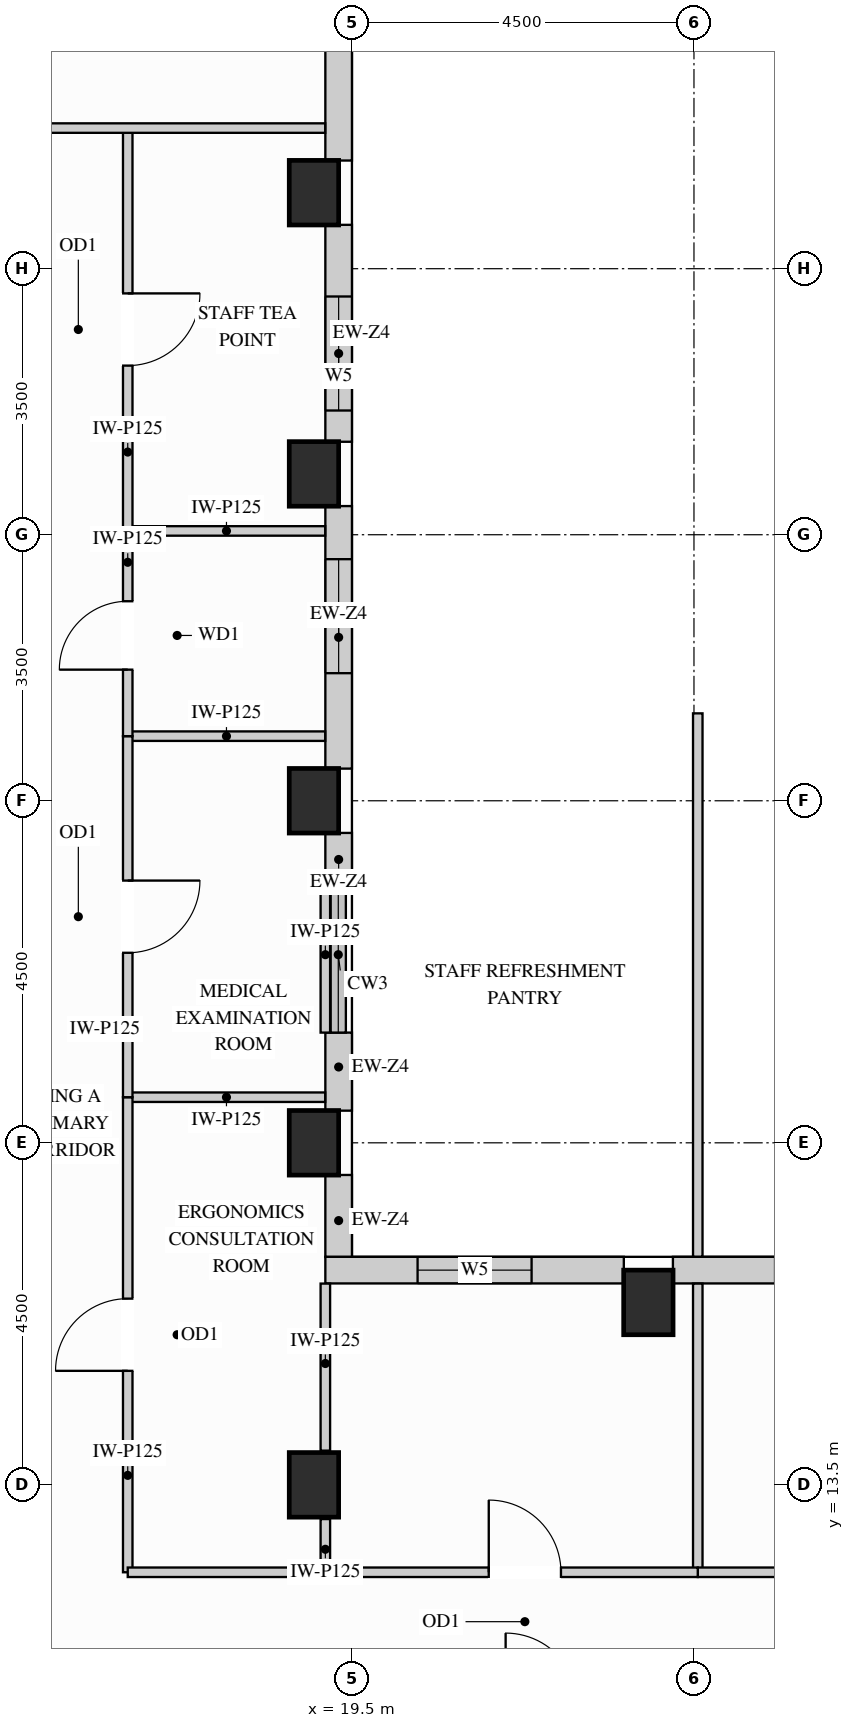
"""IFC4 building model, lengths in metres.
Left out: names, types, materials, properties, quantities, classifications, styles, units other than length and angle.
Written with IfcOpenShell. Run it as: python <this file> out.ifc"""

import sys

from ifc_helpers import new_model, si_unit, direction, frame, frame_2d, origin, origin_2d, place, context, subcontext, project, spatial, rectangle, extrude, source, transform, mapped, element, fill, save


model = new_model("IFC4")
c1 = context("Model", 3, precision=1e-05, world=origin(), true_north=direction((0.0, 1.0)))
c2 = subcontext(c1, "Body", "Model", "MODEL_VIEW")
j1 = project(units=[si_unit("LENGTHUNIT", "METRE"), si_unit("PLANEANGLEUNIT", "RADIAN")], contexts=[c1])
p1 = place(None, origin())
s1 = spatial("IfcSite", under=j1, at=p1, CompositionType="ELEMENT")
p2 = place(p1, origin())
s2 = spatial("IfcBuilding", under=s1, at=p2, CompositionType="ELEMENT")
p3 = place(p2, frame((0.0, 0.0, 226.8)))
s3 = spatial("IfcBuildingStorey", under=s2, at=p3, CompositionType="ELEMENT", Elevation=226.8)
m1 = source(origin(), c2, "Body", "SweptSolid", [
    extrude(rectangle(XDim=0.65, YDim=0.85, at=origin_2d()), origin(), (0.0, 0.0, 1.0), 3.4),
])
for number, where, z_axis, x_axis in (
    (1, (19.0, 13.5, 0.0), (0.0, 0.0, 1.0), (1.0, 0.0, 0.0)),
    (2, (19.0, 18.0, 0.0), (0.0, 0.0, 1.0), (1.0, 0.0, 0.0)),
    (3, (19.0, 22.5, 0.0), (0.0, 0.0, 1.0), (1.0, 0.0, 0.0)),
    (4, (19.0, 26.8, 0.0), (0.0, 0.0, 1.0), (1.0, 0.0, 0.0)),
    (5, (19.0, 30.5, 0.0), (0.0, 0.0, 1.0), (1.0, 0.0, 0.0)),
    (6, (23.4, 15.9, 0.0), (0.0, 0.0, 1.0), (1.0, 0.0, 0.0)),
):
    element("IfcColumn", number, at=place(p3, frame(where, z_axis=z_axis, x_axis=x_axis)), inside=s3, PredefinedType="COLUMN", context=c2, shape_type="MappedRepresentation", body=[
        mapped(m1, transform((0.0, 0.0, 0.0), x_axis=(1.0, 0.0, 0.0), y_axis=(0.0, 1.0, 0.0), z_axis=(0.0, 0.0, 1.0))),
    ])
m2 = source(origin(), c2, "Body", "SweptSolid", [
    extrude(rectangle(XDim=1.079, YDim=0.35, at=frame_2d((0.54, 0.0))), origin(), (0.0, 0.0, 1.0), 2.619),
])
p4 = place(p3, frame((19.325, 16.498, 0.0), z_axis=(0.0, 0.0, 1.0), x_axis=(0.0, 1.0, 0.0)))
e7 = element("IfcWall", 7, at=p4, inside=s3, PredefinedType="SOLIDWALL", context=c2, shape_type="MappedRepresentation", body=[
    mapped(m2, transform((0.0, 0.0, 0.0), x_axis=(1.0, 0.0, 0.0), y_axis=(0.0, 1.0, 0.0), z_axis=(0.0, 0.0, 1.0))),
])
m3 = source(origin(), c2, "Body", "SweptSolid", [
    extrude(rectangle(XDim=1.027, YDim=0.35, at=frame_2d((0.513, 0.0))), origin(), (0.0, 0.0, 1.0), 2.619),
])
p5 = place(p3, frame((19.325, 18.423, 0.0), z_axis=(0.0, 0.0, 1.0), x_axis=(0.0, 1.0, 0.0)))
e8 = element("IfcWall", 8, at=p5, inside=s3, PredefinedType="SOLIDWALL", context=c2, shape_type="MappedRepresentation", body=[
    mapped(m3, transform((0.0, 0.0, 0.0), x_axis=(1.0, 0.0, 0.0), y_axis=(0.0, 1.0, 0.0), z_axis=(0.0, 0.0, 1.0))),
])
m4 = source(origin(), c2, "Body", "SweptSolid", [
    extrude(rectangle(XDim=0.577, YDim=0.35, at=frame_2d((0.289, 0.0))), origin(), (0.0, 0.0, 1.0), 2.619),
])
p6 = place(p3, frame((19.325, 21.5, 0.0), z_axis=(0.0, 0.0, 1.0), x_axis=(0.0, 1.0, 0.0)))
e9 = element("IfcWall", 9, at=p6, inside=s3, PredefinedType="SOLIDWALL", context=c2, shape_type="MappedRepresentation", body=[
    mapped(m4, transform((0.0, 0.0, 0.0), x_axis=(1.0, 0.0, 0.0), y_axis=(0.0, 1.0, 0.0), z_axis=(0.0, 0.0, 1.0))),
])
p7 = place(p3, frame((19.325, 22.923, 0.0), z_axis=(0.0, 0.0, 1.0), x_axis=(0.0, 1.0, 0.0)))
e10 = element("IfcWall", 10, at=p7, inside=s3, PredefinedType="SOLIDWALL", context=c2, shape_type="SweptSolid", body=[
    extrude(rectangle(XDim=3.454, YDim=0.35, at=frame_2d((1.727, 0.0))), origin(), (0.0, 0.0, 1.0), 2.619),
])
p8 = place(p7, frame((1.256, 0.0, 0.78)))
e11 = element("IfcOpeningElement", 11, at=p8, cuts=e10, PredefinedType="OPENING", context=c2, shape_type="SweptSolid", body=[
    extrude(rectangle(XDim=1.5, YDim=1.659, at=frame_2d((0.75, 0.83))), frame((0.0, 0.185, 0.0), z_axis=(0.0, -1.0, 0.0), x_axis=(1.0, 0.0, 0.0)), (0.0, 0.0, 1.0), 0.37),
])
p9 = place(p3, frame((19.325, 27.223, 0.0), z_axis=(0.0, 0.0, 1.0), x_axis=(0.0, 1.0, 0.0)))
e12 = element("IfcWall", 12, at=p9, inside=s3, PredefinedType="SOLIDWALL", context=c2, shape_type="SweptSolid", body=[
    extrude(rectangle(XDim=2.854, YDim=0.35, at=frame_2d((1.427, 0.0))), origin(), (0.0, 0.0, 1.0), 2.619),
])
p10 = place(p9, frame((0.411, 0.0, 0.78)))
e13 = element("IfcOpeningElement", 13, at=p10, cuts=e12, PredefinedType="OPENING", context=c2, shape_type="SweptSolid", body=[
    extrude(rectangle(XDim=1.5, YDim=1.659, at=frame_2d((0.75, 0.83))), frame((0.0, 0.185, 0.0), z_axis=(0.0, -1.0, 0.0), x_axis=(1.0, 0.0, 0.0)), (0.0, 0.0, 1.0), 0.37),
])
m5 = source(origin(), c2, "Body", "SweptSolid", [
    extrude(rectangle(XDim=3.654, YDim=0.35, at=frame_2d((1.827, 0.0))), origin(), (0.0, 0.0, 1.0), 2.619),
])
p11 = place(p3, frame((19.325, 30.923, 0.0), z_axis=(0.0, 0.0, 1.0), x_axis=(0.0, 1.0, 0.0)))
e14 = element("IfcWall", 14, at=p11, inside=s3, PredefinedType="SOLIDWALL", context=c2, shape_type="MappedRepresentation", body=[
    mapped(m5, transform((0.0, 0.0, 0.0), x_axis=(1.0, 0.0, 0.0), y_axis=(0.0, 1.0, 0.0), z_axis=(0.0, 0.0, 1.0))),
])
p12 = place(p3, frame((30.177, 16.325, 0.0), z_axis=(0.0, 0.0, 1.0), x_axis=(-1.0, 0.0, 0.0)))
e15 = element("IfcWall", 15, at=p12, inside=s3, PredefinedType="SOLIDWALL", context=c2, shape_type="SweptSolid", body=[
    extrude(rectangle(XDim=6.454, YDim=0.35, at=frame_2d((3.227, 0.0))), origin(), (0.0, 0.0, 1.0), 3.385),
])
p13 = place(p12, frame((1.344, 0.0, 0.78)))
e16 = element("IfcOpeningElement", 16, at=p13, cuts=e15, PredefinedType="OPENING", context=c2, shape_type="SweptSolid", body=[
    extrude(rectangle(XDim=1.5, YDim=2.0, at=frame_2d((0.75, 1.0))), frame((0.0, 0.185, 0.0), z_axis=(0.0, -1.0, 0.0), x_axis=(1.0, 0.0, 0.0)), (0.0, 0.0, 1.0), 0.37),
])
p14 = place(p12, frame((3.61, 0.0, 0.78)))
e17 = element("IfcOpeningElement", 17, at=p14, cuts=e15, PredefinedType="OPENING", context=c2, shape_type="SweptSolid", body=[
    extrude(rectangle(XDim=1.5, YDim=2.0, at=frame_2d((0.75, 1.0))), frame((0.0, 0.185, 0.0), z_axis=(0.0, -1.0, 0.0), x_axis=(1.0, 0.0, 0.0)), (0.0, 0.0, 1.0), 0.37),
])
p15 = place(p3, frame((23.077, 16.325, 0.0), z_axis=(0.0, 0.0, 1.0), x_axis=(-1.0, 0.0, 0.0)))
e18 = element("IfcWall", 18, at=p15, inside=s3, PredefinedType="SOLIDWALL", context=c2, shape_type="SweptSolid", body=[
    extrude(rectangle(XDim=3.927, YDim=0.35, at=frame_2d((1.963, 0.0))), origin(), (0.0, 0.0, 1.0), 3.385),
])
p16 = place(p15, frame((1.213, 0.0, 0.78)))
e19 = element("IfcOpeningElement", 19, at=p16, cuts=e18, PredefinedType="OPENING", context=c2, shape_type="SweptSolid", body=[
    extrude(rectangle(XDim=1.5, YDim=2.0, at=frame_2d((0.75, 1.0))), frame((0.0, 0.185, 0.0), z_axis=(0.0, -1.0, 0.0), x_axis=(1.0, 0.0, 0.0)), (0.0, 0.0, 1.0), 0.37),
])
m6 = source(origin(), c2, "Body", "SweptSolid", [
    extrude(rectangle(XDim=2.598, YDim=0.125, at=frame_2d((1.299, 0.0))), origin(), (0.0, 0.0, 1.0), 3.385),
])
for number, where, z_axis, x_axis in (
    (20, (16.55, 18.6, 0.0), (0.0, 0.0, 1.0), (1.0, 0.0, 0.0)),
    (21, (16.55, 23.35, 0.0), (0.0, 0.0, 1.0), (1.0, 0.0, 0.0)),
    (22, (16.55, 26.05, 0.0), (0.0, 0.0, 1.0), (1.0, 0.0, 0.0)),
):
    element("IfcWall", number, at=place(p3, frame(where, z_axis=z_axis, x_axis=x_axis)), inside=s3, PredefinedType="PARTITIONING", context=c2, shape_type="MappedRepresentation", body=[
        mapped(m6, transform((0.0, 0.0, 0.0), x_axis=(1.0, 0.0, 0.0), y_axis=(0.0, 1.0, 0.0), z_axis=(0.0, 0.0, 1.0))),
    ])
m7 = source(origin(), c2, "Body", "SweptSolid", [
    extrude(rectangle(XDim=0.7, YDim=0.125, at=frame_2d((0.35, 0.0))), origin(), (0.0, 0.0, 1.0), 2.773),
])
p17 = place(p3, frame((19.15, 12.35, 0.0), z_axis=(0.0, 0.0, 1.0), x_axis=(0.0, 1.0, 0.0)))
e23 = element("IfcWall", 23, at=p17, inside=s3, PredefinedType="PARTITIONING", context=c2, shape_type="MappedRepresentation", body=[
    mapped(m7, transform((0.0, 0.0, 0.0), x_axis=(1.0, 0.0, 0.0), y_axis=(0.0, 1.0, 0.0), z_axis=(0.0, 0.0, 1.0))),
])
m8 = source(origin(), c2, "Body", "SweptSolid", [
    extrude(rectangle(XDim=2.198, YDim=0.125, at=frame_2d((1.099, 0.0))), origin(), (0.0, 0.0, 1.0), 2.619),
])
p18 = place(p3, frame((19.15, 13.95, 0.0), z_axis=(0.0, 0.0, 1.0), x_axis=(0.0, 1.0, 0.0)))
e24 = element("IfcWall", 24, at=p18, inside=s3, PredefinedType="PARTITIONING", context=c2, shape_type="MappedRepresentation", body=[
    mapped(m8, transform((0.0, 0.0, 0.0), x_axis=(1.0, 0.0, 0.0), y_axis=(0.0, 1.0, 0.0), z_axis=(0.0, 0.0, 1.0))),
])
m9 = source(origin(), c2, "Body", "SweptSolid", [
    extrude(rectangle(XDim=2.05, YDim=0.125, at=frame_2d((1.025, 0.0))), origin(), (0.0, 0.0, 1.0), 2.619),
])
p19 = place(p3, frame((19.15, 19.45, 0.0), z_axis=(0.0, 0.0, 1.0), x_axis=(0.0, 1.0, 0.0)))
e25 = element("IfcWall", 25, at=p19, inside=s3, PredefinedType="PARTITIONING", context=c2, shape_type="MappedRepresentation", body=[
    mapped(m9, transform((0.0, 0.0, 0.0), x_axis=(1.0, 0.0, 0.0), y_axis=(0.0, 1.0, 0.0), z_axis=(0.0, 0.0, 1.0))),
])
p20 = place(p3, frame((16.55, 12.35, 0.0), z_axis=(0.0, 0.0, 1.0), x_axis=(0.0, 1.0, 0.0)))
e26 = element("IfcWall", 26, at=p20, inside=s3, PredefinedType="PARTITIONING", context=c2, shape_type="SweptSolid", body=[
    extrude(rectangle(XDim=6.25, YDim=0.125, at=frame_2d((3.125, 0.0))), origin(), (0.0, 0.0, 1.0), 3.385),
])
p21 = place(p20, frame((2.65, 0.0, 0.0)))
e27 = element("IfcOpeningElement", 27, at=p21, cuts=e26, PredefinedType="OPENING", context=c2, shape_type="SweptSolid", body=[
    extrude(rectangle(XDim=0.95, YDim=2.15, at=frame_2d((0.475, 1.075))), frame((0.0, 0.073, 0.0), z_axis=(0.0, -1.0, 0.0), x_axis=(1.0, 0.0, 0.0)), (0.0, 0.0, 1.0), 0.145),
])
p22 = place(p3, frame((16.55, 18.6, 0.0), z_axis=(0.0, 0.0, 1.0), x_axis=(0.0, 1.0, 0.0)))
e28 = element("IfcWall", 28, at=p22, inside=s3, PredefinedType="PARTITIONING", context=c2, shape_type="SweptSolid", body=[
    extrude(rectangle(XDim=4.75, YDim=0.125, at=frame_2d((2.375, 0.0))), origin(), (0.0, 0.0, 1.0), 3.385),
])
p23 = place(p22, frame((1.9, 0.0, 0.0)))
e29 = element("IfcOpeningElement", 29, at=p23, cuts=e28, PredefinedType="OPENING", context=c2, shape_type="SweptSolid", body=[
    extrude(rectangle(XDim=0.95, YDim=2.15, at=frame_2d((0.475, 1.075))), frame((0.0, 0.073, 0.0), z_axis=(0.0, -1.0, 0.0), x_axis=(1.0, 0.0, 0.0)), (0.0, 0.0, 1.0), 0.145),
])
p24 = place(p3, frame((16.55, 26.05, 0.0), z_axis=(0.0, 0.0, 1.0), x_axis=(0.0, 1.0, 0.0)))
e30 = element("IfcWall", 30, at=p24, inside=s3, PredefinedType="PARTITIONING", context=c2, shape_type="SweptSolid", body=[
    extrude(rectangle(XDim=5.3, YDim=0.125, at=frame_2d((2.65, 0.0))), origin(), (0.0, 0.0, 1.0), 3.385),
])
p25 = place(p24, frame((2.175, 0.0, 0.0)))
e31 = element("IfcOpeningElement", 31, at=p25, cuts=e30, PredefinedType="OPENING", context=c2, shape_type="SweptSolid", body=[
    extrude(rectangle(XDim=0.95, YDim=2.15, at=frame_2d((0.475, 1.075))), frame((0.0, 0.073, 0.0), z_axis=(0.0, -1.0, 0.0), x_axis=(1.0, 0.0, 0.0)), (0.0, 0.0, 1.0), 0.145),
])
p26 = place(p3, frame((16.55, 23.35, 0.0), z_axis=(0.0, 0.0, 1.0), x_axis=(0.0, 1.0, 0.0)))
e32 = element("IfcWall", 32, at=p26, inside=s3, PredefinedType="PARTITIONING", context=c2, shape_type="SweptSolid", body=[
    extrude(rectangle(XDim=2.7, YDim=0.125, at=frame_2d((1.35, 0.0))), origin(), (0.0, 0.0, 1.0), 3.385),
])
p27 = place(p26, frame((0.875, 0.0, 0.0)))
e33 = element("IfcOpeningElement", 33, at=p27, cuts=e32, PredefinedType="OPENING", context=c2, shape_type="SweptSolid", body=[
    extrude(rectangle(XDim=0.9, YDim=2.15, at=frame_2d((0.45, 1.075))), frame((0.0, 0.073, 0.0), z_axis=(0.0, -1.0, 0.0), x_axis=(1.0, 0.0, 0.0)), (0.0, 0.0, 1.0), 0.145),
])
m10 = source(origin(), c2, "Body", "SweptSolid", [
    extrude(rectangle(XDim=7.498, YDim=0.125, at=frame_2d((3.749, 0.0))), origin(), (0.0, 0.0, 1.0), 3.385),
])
p28 = place(p3, frame((11.65, 31.35, 0.0), z_axis=(0.0, 0.0, 1.0), x_axis=(1.0, 0.0, 0.0)))
e34 = element("IfcWall", 34, at=p28, inside=s3, PredefinedType="PARTITIONING", context=c2, shape_type="MappedRepresentation", body=[
    mapped(m10, transform((0.0, 0.0, 0.0), x_axis=(1.0, 0.0, 0.0), y_axis=(0.0, 1.0, 0.0), z_axis=(0.0, 0.0, 1.0))),
])
m11 = source(origin(), c2, "Body", "SweptSolid", [
    extrude(rectangle(XDim=3.798, YDim=0.125, at=frame_2d((1.899, 0.0))), origin(), (0.0, 0.0, 1.0), 3.385),
])
p29 = place(p3, frame((24.05, 12.35, 0.0), z_axis=(0.0, 0.0, 1.0), x_axis=(0.0, 1.0, 0.0)))
e35 = element("IfcWall", 35, at=p29, inside=s3, PredefinedType="PARTITIONING", context=c2, shape_type="MappedRepresentation", body=[
    mapped(m11, transform((0.0, 0.0, 0.0), x_axis=(1.0, 0.0, 0.0), y_axis=(0.0, 1.0, 0.0), z_axis=(0.0, 0.0, 1.0))),
])
m12 = source(origin(), c2, "Body", "SweptSolid", [
    extrude(rectangle(XDim=7.148, YDim=0.125, at=frame_2d((3.574, 0.0))), origin(), (0.0, 0.0, 1.0), 3.385),
])
p30 = place(p3, frame((24.05, 16.502, 0.0), z_axis=(0.0, 0.0, 1.0), x_axis=(0.0, 1.0, 0.0)))
e36 = element("IfcWall", 36, at=p30, inside=s3, PredefinedType="PARTITIONING", context=c2, shape_type="MappedRepresentation", body=[
    mapped(m12, transform((0.0, 0.0, 0.0), x_axis=(1.0, 0.0, 0.0), y_axis=(0.0, 1.0, 0.0), z_axis=(0.0, 0.0, 1.0))),
])
p31 = place(p3, frame((24.05, 12.35, 0.0), z_axis=(0.0, 0.0, 1.0), x_axis=(1.0, 0.0, 0.0)))
e37 = element("IfcWall", 37, at=p31, inside=s3, PredefinedType="PARTITIONING", context=c2, shape_type="SweptSolid", body=[
    extrude(rectangle(XDim=5.8, YDim=0.125, at=frame_2d((2.9, 0.0))), origin(), (0.0, 0.0, 1.0), 3.385),
])
p32 = place(p31, frame((2.425, 0.0, 0.0)))
e38 = element("IfcOpeningElement", 38, at=p32, cuts=e37, PredefinedType="OPENING", context=c2, shape_type="SweptSolid", body=[
    extrude(rectangle(XDim=0.95, YDim=2.15, at=frame_2d((0.475, 1.075))), frame((0.0, 0.073, 0.0), z_axis=(0.0, -1.0, 0.0), x_axis=(1.0, 0.0, 0.0)), (0.0, 0.0, 1.0), 0.145),
])
m13 = source(origin(), c2, "Body", "SweptSolid", [
    extrude(rectangle(XDim=2.95, YDim=0.125, at=frame_2d((1.475, 0.0))), origin(), (0.0, 0.0, 1.0), 3.385),
])
p33 = place(p3, frame((16.55, 12.35, 0.0), z_axis=(0.0, 0.0, 1.0), x_axis=(1.0, 0.0, 0.0)))
e39 = element("IfcWall", 39, at=p33, inside=s3, PredefinedType="PARTITIONING", context=c2, shape_type="MappedRepresentation", body=[
    mapped(m13, transform((0.0, 0.0, 0.0), x_axis=(1.0, 0.0, 0.0), y_axis=(0.0, 1.0, 0.0), z_axis=(0.0, 0.0, 1.0))),
])
p34 = place(p3, frame((19.5, 12.35, 0.0), z_axis=(0.0, 0.0, 1.0), x_axis=(1.0, 0.0, 0.0)))
e40 = element("IfcWall", 40, at=p34, inside=s3, PredefinedType="PARTITIONING", context=c2, shape_type="SweptSolid", body=[
    extrude(rectangle(XDim=4.55, YDim=0.125, at=frame_2d((2.275, 0.0))), origin(), (0.0, 0.0, 1.0), 3.385),
])
p35 = place(p34, frame((1.8, 0.0, 0.0)))
e41 = element("IfcOpeningElement", 41, at=p35, cuts=e40, PredefinedType="OPENING", context=c2, shape_type="SweptSolid", body=[
    extrude(rectangle(XDim=0.95, YDim=2.15, at=frame_2d((0.475, 1.075))), frame((0.0, 0.073, 0.0), z_axis=(0.0, -1.0, 0.0), x_axis=(1.0, 0.0, 0.0)), (0.0, 0.0, 1.0), 0.145),
])
m14 = source(origin(), c2, "Body", "SweptSolid", [
    extrude(rectangle(XDim=0.95, YDim=2.15, at=frame_2d((0.475, 1.075))), frame((0.0, 0.025, 0.0), z_axis=(0.0, -1.0, 0.0), x_axis=(1.0, 0.0, 0.0)), (0.0, 0.0, 1.0), 0.05),
])
p36 = place(p21, origin())
e42 = element("IfcDoor", 42, at=p36, inside=s3, OperationType="SINGLE_SWING_LEFT", PredefinedType="DOOR", context=c2, shape_type="MappedRepresentation", body=[
    mapped(m14, transform((0.0, 0.0, 0.0), x_axis=(1.0, 0.0, 0.0), y_axis=(0.0, 1.0, 0.0), z_axis=(0.0, 0.0, 1.0))),
])
fill(e27, e42)
p37 = place(p23, origin())
e43 = element("IfcDoor", 43, at=p37, inside=s3, OperationType="SINGLE_SWING_RIGHT", PredefinedType="DOOR", context=c2, shape_type="MappedRepresentation", body=[
    mapped(m14, transform((0.0, 0.0, 0.0), x_axis=(1.0, 0.0, 0.0), y_axis=(0.0, 1.0, 0.0), z_axis=(0.0, 0.0, 1.0))),
])
fill(e29, e43)
p38 = place(p25, origin())
e44 = element("IfcDoor", 44, at=p38, inside=s3, OperationType="SINGLE_SWING_RIGHT", PredefinedType="DOOR", context=c2, shape_type="MappedRepresentation", body=[
    mapped(m14, transform((0.0, 0.0, 0.0), x_axis=(1.0, 0.0, 0.0), y_axis=(0.0, 1.0, 0.0), z_axis=(0.0, 0.0, 1.0))),
])
fill(e31, e44)
p39 = place(p35, origin())
e45 = element("IfcDoor", 45, at=p39, inside=s3, OperationType="SINGLE_SWING_LEFT", PredefinedType="DOOR", context=c2, shape_type="MappedRepresentation", body=[
    mapped(m14, transform((0.0, 0.0, 0.0), x_axis=(1.0, 0.0, 0.0), y_axis=(0.0, 1.0, 0.0), z_axis=(0.0, 0.0, 1.0))),
])
fill(e41, e45)
m15 = source(origin(), c2, "Body", "SweptSolid", [
    extrude(rectangle(XDim=0.9, YDim=2.15, at=frame_2d((0.45, 1.075))), frame((0.0, 0.025, 0.0), z_axis=(0.0, -1.0, 0.0), x_axis=(1.0, 0.0, 0.0)), (0.0, 0.0, 1.0), 0.05),
])
p40 = place(p27, origin())
e46 = element("IfcDoor", 46, at=p40, inside=s3, OperationType="SINGLE_SWING_LEFT", PredefinedType="DOOR", context=c2, shape_type="MappedRepresentation", body=[
    mapped(m15, transform((0.0, 0.0, 0.0), x_axis=(1.0, 0.0, 0.0), y_axis=(0.0, 1.0, 0.0), z_axis=(0.0, 0.0, 1.0))),
])
fill(e33, e46)
m16 = source(origin(), c2, "Body", "SweptSolid", [
    extrude(rectangle(XDim=1.5, YDim=1.659, at=frame_2d((0.75, 0.83))), frame((0.0, 0.03, 0.0), z_axis=(0.0, -1.0, 0.0), x_axis=(1.0, 0.0, 0.0)), (0.0, 0.0, 1.0), 0.06),
])
p41 = place(p8, origin())
e47 = element("IfcWindow", 47, at=p41, inside=s3, PartitioningType="SINGLE_PANEL", PredefinedType="WINDOW", context=c2, shape_type="MappedRepresentation", body=[
    mapped(m16, transform((0.0, 0.0, 0.0), x_axis=(1.0, 0.0, 0.0), y_axis=(0.0, 1.0, 0.0), z_axis=(0.0, 0.0, 1.0))),
])
fill(e11, e47)
p42 = place(p10, origin())
e48 = element("IfcWindow", 48, at=p42, inside=s3, PartitioningType="SINGLE_PANEL", PredefinedType="WINDOW", context=c2, shape_type="MappedRepresentation", body=[
    mapped(m16, transform((0.0, 0.0, 0.0), x_axis=(1.0, 0.0, 0.0), y_axis=(0.0, 1.0, 0.0), z_axis=(0.0, 0.0, 1.0))),
])
fill(e13, e48)
m17 = source(origin(), c2, "Body", "SweptSolid", [
    extrude(rectangle(XDim=1.5, YDim=2.0, at=frame_2d((0.75, 1.0))), frame((0.0, 0.03, 0.0), z_axis=(0.0, -1.0, 0.0), x_axis=(1.0, 0.0, 0.0)), (0.0, 0.0, 1.0), 0.06),
])
p43 = place(p16, origin())
e49 = element("IfcWindow", 49, at=p43, inside=s3, PartitioningType="SINGLE_PANEL", PredefinedType="WINDOW", context=c2, shape_type="MappedRepresentation", body=[
    mapped(m17, transform((0.0, 0.0, 0.0), x_axis=(1.0, 0.0, 0.0), y_axis=(0.0, 1.0, 0.0), z_axis=(0.0, 0.0, 1.0))),
])
fill(e19, e49)
save(model, sys.argv[1])
